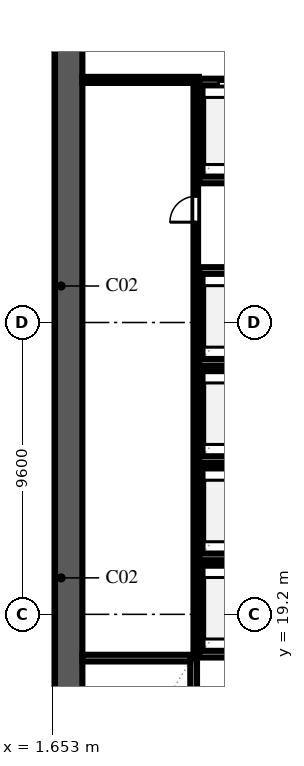
"""IFC4 building model, lengths in metres.
Left out: names, types, materials, properties, quantities, classifications, styles, units other than length and angle.
Written with IfcOpenShell. Run it as: python <this file> out.ifc"""

import sys

from ifc_helpers import new_model, si_unit, direction, frame, frame_2d, origin, place, context, subcontext, project, spatial, rectangle, extrude, element, fill, save


model = new_model("IFC4")
c1 = context("Model", 3, precision=1e-05, world=origin(), true_north=direction((0.0, 1.0)))
c2 = subcontext(c1, "Body", "Model", "MODEL_VIEW")
j1 = project(units=[si_unit("LENGTHUNIT", "METRE"), si_unit("PLANEANGLEUNIT", "RADIAN")], contexts=[c1])
p1 = place(None, origin())
s1 = spatial("IfcSite", under=j1, at=p1, CompositionType="ELEMENT")
p2 = place(p1, origin())
s2 = spatial("IfcBuilding", under=s1, at=p2, CompositionType="ELEMENT")
p3 = place(p2, frame((0.0, 0.0, 24.2)))
s3 = spatial("IfcBuildingStorey", under=s2, at=p3, CompositionType="ELEMENT", Elevation=24.2)
p4 = place(p3, frame((2.2, 9.15, 0.0), z_axis=(0.0, 0.0, 1.0), x_axis=(0.0, 1.0, 0.0)))
e1 = element("IfcWall", 1, at=p4, inside=s3, PredefinedType="SHEAR", context=c2, shape_type="SweptSolid", body=[
    extrude(rectangle(XDim=39.3, YDim=0.9, at=frame_2d((19.65, 0.0))), origin(), (0.0, 0.0, 1.0), 3.54),
])
p5 = place(p3, frame((6.31, 9.95, 0.0), z_axis=(0.0, 0.0, 1.0), x_axis=(0.0, 1.0, 0.0)))
e2 = element("IfcWall", 2, at=p5, inside=s3, PredefinedType="SOLIDWALL", context=c2, shape_type="SweptSolid", body=[
    extrude(rectangle(XDim=7.81, YDim=0.22, at=frame_2d((3.905, 0.0))), origin(), (0.0, 0.0, 1.0), 3.54),
])
p6 = place(p5, frame((0.14, 0.0, 0.0)))
e3 = element("IfcOpeningElement", 3, at=p6, cuts=e2, PredefinedType="OPENING", context=c2, shape_type="SweptSolid", body=[
    extrude(rectangle(XDim=1.1, YDim=2.2, at=frame_2d((0.55, 1.1))), frame((0.0, 0.122, 0.0), z_axis=(0.0, -1.0, 0.0), x_axis=(1.0, 0.0, 0.0)), (0.0, 0.0, 1.0), 0.244),
])
p7 = place(p3, frame((2.65, 17.76, 0.0), z_axis=(0.0, 0.0, 1.0), x_axis=(1.0, 0.0, 0.0)))
e4 = element("IfcWall", 4, at=p7, inside=s3, PredefinedType="SOLIDWALL", context=c2, shape_type="SweptSolid", body=[
    extrude(rectangle(XDim=3.55, YDim=0.22, at=frame_2d((1.775, 0.0))), origin(), (0.0, 0.0, 1.0), 3.54),
])
p8 = place(p3, frame((6.49, 18.11, 0.0), z_axis=(0.0, 0.0, 1.0), x_axis=(0.0, 1.0, 0.0)))
e5 = element("IfcWall", 5, at=p8, inside=s3, PredefinedType="SOLIDWALL", context=c2, shape_type="SweptSolid", body=[
    extrude(rectangle(XDim=2.58, YDim=0.22, at=frame_2d((1.29, 0.0))), origin(), (0.0, 0.0, 1.0), 3.54),
])
for number, where, z_axis, x_axis in (
    (6, (6.49, 17.89, 0.0), (0.0, 0.0, 1.0), (1.0, 0.0, 0.0)),
    (7, (6.49, 20.91, 0.0), (0.0, 0.0, 1.0), (1.0, 0.0, 0.0)),
):
    element("IfcWall", number, at=place(p3, frame(where, z_axis=z_axis, x_axis=x_axis)), inside=s3, PredefinedType="SOLIDWALL", context=c2, shape_type="SweptSolid", body=[
        extrude(rectangle(XDim=2.47, YDim=0.22, at=frame_2d((1.235, 0.0))), origin(), (0.0, 0.0, 1.0), 3.54),
    ])
p9 = place(p3, frame((6.49, 21.31, 0.0), z_axis=(0.0, 0.0, 1.0), x_axis=(0.0, 1.0, 0.0)))
e8 = element("IfcWall", 8, at=p9, inside=s3, PredefinedType="SOLIDWALL", context=c2, shape_type="SweptSolid", body=[
    extrude(rectangle(XDim=2.58, YDim=0.22, at=frame_2d((1.29, 0.0))), origin(), (0.0, 0.0, 1.0), 3.54),
])
for number, where, z_axis, x_axis in (
    (9, (6.49, 21.09, 0.0), (0.0, 0.0, 1.0), (1.0, 0.0, 0.0)),
    (10, (6.49, 24.11, 0.0), (0.0, 0.0, 1.0), (1.0, 0.0, 0.0)),
):
    element("IfcWall", number, at=place(p3, frame(where, z_axis=z_axis, x_axis=x_axis)), inside=s3, PredefinedType="SOLIDWALL", context=c2, shape_type="SweptSolid", body=[
        extrude(rectangle(XDim=2.47, YDim=0.22, at=frame_2d((1.235, 0.0))), origin(), (0.0, 0.0, 1.0), 3.54),
    ])
p10 = place(p3, frame((6.49, 24.51, 0.0), z_axis=(0.0, 0.0, 1.0), x_axis=(0.0, 1.0, 0.0)))
e11 = element("IfcWall", 11, at=p10, inside=s3, PredefinedType="SOLIDWALL", context=c2, shape_type="SweptSolid", body=[
    extrude(rectangle(XDim=2.58, YDim=0.22, at=frame_2d((1.29, 0.0))), origin(), (0.0, 0.0, 1.0), 3.54),
])
for number, where, z_axis, x_axis in (
    (12, (6.49, 24.29, 0.0), (0.0, 0.0, 1.0), (1.0, 0.0, 0.0)),
    (13, (6.49, 27.31, 0.0), (0.0, 0.0, 1.0), (1.0, 0.0, 0.0)),
):
    element("IfcWall", number, at=place(p3, frame(where, z_axis=z_axis, x_axis=x_axis)), inside=s3, PredefinedType="SOLIDWALL", context=c2, shape_type="SweptSolid", body=[
        extrude(rectangle(XDim=2.47, YDim=0.22, at=frame_2d((1.235, 0.0))), origin(), (0.0, 0.0, 1.0), 3.54),
    ])
p11 = place(p3, frame((6.49, 27.71, 0.0), z_axis=(0.0, 0.0, 1.0), x_axis=(0.0, 1.0, 0.0)))
e14 = element("IfcWall", 14, at=p11, inside=s3, PredefinedType="SOLIDWALL", context=c2, shape_type="SweptSolid", body=[
    extrude(rectangle(XDim=2.58, YDim=0.22, at=frame_2d((1.29, 0.0))), origin(), (0.0, 0.0, 1.0), 3.54),
])
for number, where, z_axis, x_axis in (
    (15, (6.49, 27.49, 0.0), (0.0, 0.0, 1.0), (1.0, 0.0, 0.0)),
    (16, (6.49, 30.51, 0.0), (0.0, 0.0, 1.0), (1.0, 0.0, 0.0)),
):
    element("IfcWall", number, at=place(p3, frame(where, z_axis=z_axis, x_axis=x_axis)), inside=s3, PredefinedType="SOLIDWALL", context=c2, shape_type="SweptSolid", body=[
        extrude(rectangle(XDim=2.47, YDim=0.22, at=frame_2d((1.235, 0.0))), origin(), (0.0, 0.0, 1.0), 3.54),
    ])
p12 = place(p3, frame((6.49, 33.71, 0.0), z_axis=(0.0, 0.0, 1.0), x_axis=(0.0, 1.0, 0.0)))
e17 = element("IfcWall", 17, at=p12, inside=s3, PredefinedType="SOLIDWALL", context=c2, shape_type="SweptSolid", body=[
    extrude(rectangle(XDim=2.78, YDim=0.22, at=frame_2d((1.39, 0.0))), origin(), (0.0, 0.0, 1.0), 3.54),
])
p13 = place(p3, frame((6.49, 33.49, 0.0), z_axis=(0.0, 0.0, 1.0), x_axis=(1.0, 0.0, 0.0)))
e18 = element("IfcWall", 18, at=p13, inside=s3, PredefinedType="SOLIDWALL", context=c2, shape_type="SweptSolid", body=[
    extrude(rectangle(XDim=2.47, YDim=0.22, at=frame_2d((1.235, 0.0))), origin(), (0.0, 0.0, 1.0), 3.54),
])
p14 = place(p3, frame((6.49, 36.71, 0.0), z_axis=(0.0, 0.0, 1.0), x_axis=(1.0, 0.0, 0.0)))
e19 = element("IfcWall", 19, at=p14, inside=s3, PredefinedType="SOLIDWALL", context=c2, shape_type="SweptSolid", body=[
    extrude(rectangle(XDim=2.47, YDim=0.22, at=frame_2d((1.235, 0.0))), origin(), (0.0, 0.0, 1.0), 3.54),
])
p15 = place(p14, frame((0.635, 0.0, 0.0)))
e20 = element("IfcOpeningElement", 20, at=p15, cuts=e19, PredefinedType="OPENING", context=c2, shape_type="SweptSolid", body=[
    extrude(rectangle(XDim=1.2, YDim=2.2, at=frame_2d((0.6, 1.1))), frame((0.0, 0.122, 0.0), z_axis=(0.0, -1.0, 0.0), x_axis=(1.0, 0.0, 0.0)), (0.0, 0.0, 1.0), 0.244),
])
p16 = place(p3, frame((2.65, 36.78, 0.0), z_axis=(0.0, 0.0, 1.0), x_axis=(1.0, 0.0, 0.0)))
e21 = element("IfcWall", 21, at=p16, inside=s3, PredefinedType="SOLIDWALL", context=c2, shape_type="SweptSolid", body=[
    extrude(rectangle(XDim=3.83, YDim=0.2, at=frame_2d((1.915, 0.0))), origin(), (0.0, 0.0, 1.0), 3.54),
])
p17 = place(p3, frame((6.38, 17.8, 0.0), z_axis=(0.0, 0.0, 1.0), x_axis=(0.0, 1.0, 0.0)))
e22 = element("IfcWall", 22, at=p17, inside=s3, PredefinedType="PARTITIONING", context=c2, shape_type="SweptSolid", body=[
    extrude(rectangle(XDim=18.98, YDim=0.15, at=frame_2d((9.49, 0.0))), origin(), (0.0, 0.0, 1.0), 3.54),
])
p18 = place(p17, frame((14.3, 0.0, 0.0)))
e23 = element("IfcOpeningElement", 23, at=p18, cuts=e22, PredefinedType="OPENING", context=c2, shape_type="SweptSolid", body=[
    extrude(rectangle(XDim=0.85, YDim=2.1, at=frame_2d((0.425, 1.05))), frame((0.0, 0.087, 0.0), z_axis=(0.0, -1.0, 0.0), x_axis=(1.0, 0.0, 0.0)), (0.0, 0.0, 1.0), 0.174),
])
p19 = place(p15, origin())
e24 = element("IfcDoor", 24, at=p19, inside=s3, OperationType="DOUBLE_DOOR_SLIDING", PredefinedType="DOOR", context=c2, shape_type="SweptSolid", body=[
    extrude(rectangle(XDim=1.2, YDim=2.2, at=frame_2d((0.6, 1.1))), frame((0.0, 0.025, 0.0), z_axis=(0.0, -1.0, 0.0), x_axis=(1.0, 0.0, 0.0)), (0.0, 0.0, 1.0), 0.05),
])
fill(e20, e24)
p20 = place(p18, origin())
e25 = element("IfcDoor", 25, at=p20, inside=s3, OperationType="SINGLE_SWING_LEFT", PredefinedType="DOOR", context=c2, shape_type="SweptSolid", body=[
    extrude(rectangle(XDim=0.85, YDim=2.1, at=frame_2d((0.425, 1.05))), frame((0.0, 0.025, 0.0), z_axis=(0.0, -1.0, 0.0), x_axis=(1.0, 0.0, 0.0)), (0.0, 0.0, 1.0), 0.05),
])
fill(e23, e25)
save(model, sys.argv[1])
